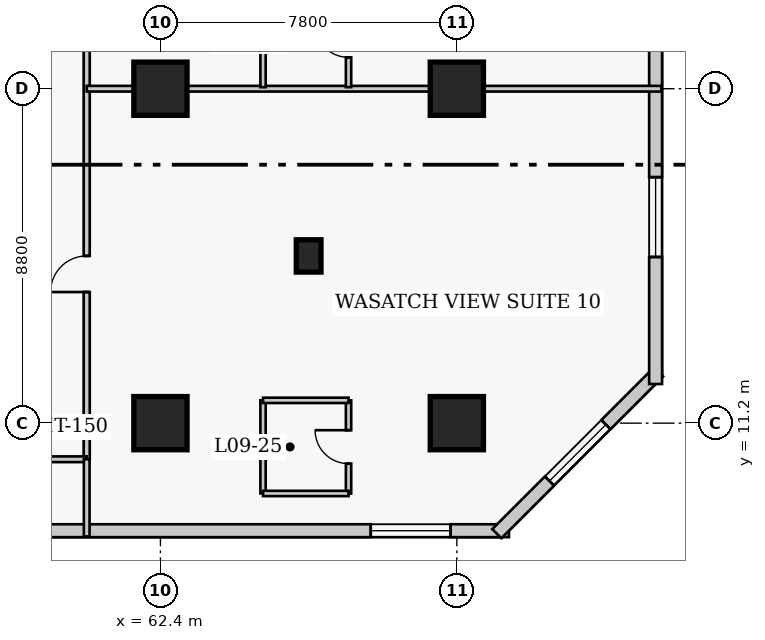
"""IFC4 building model, lengths in metres.
Left out: names, types, materials, properties, quantities, classifications, styles, units other than length and angle.
Written with IfcOpenShell. Run it as: python <this file> out.ifc"""

import sys

from ifc_helpers import new_model, si_unit, direction, frame, frame_2d, origin, origin_2d, place, context, subcontext, project, spatial, rectangle, extrude, element, fill, save


model = new_model("IFC4")
c1 = context("Model", 3, precision=1e-05, world=origin(), true_north=direction((0.0, 1.0)))
c2 = subcontext(c1, "Body", "Model", "MODEL_VIEW")
j1 = project(units=[si_unit("LENGTHUNIT", "METRE"), si_unit("PLANEANGLEUNIT", "RADIAN")], contexts=[c1])
p1 = place(None, origin())
s1 = spatial("IfcSite", under=j1, at=p1, CompositionType="ELEMENT")
p2 = place(p1, origin())
s2 = spatial("IfcBuilding", under=s1, at=p2, CompositionType="ELEMENT")
p3 = place(p2, frame((0.0, 0.0, 41.2)))
s3 = spatial("IfcBuildingStorey", under=s2, at=p3, CompositionType="ELEMENT", Elevation=41.2)
for number, where, z_axis, x_axis in (
    (1, (62.4, 11.2, 0.0), (0.0, 0.0, 1.0), (1.0, 0.0, 0.0)),
    (2, (62.4, 20.0, 0.0), (0.0, 0.0, 1.0), (1.0, 0.0, 0.0)),
    (3, (70.2, 11.2, 0.0), (0.0, 0.0, 1.0), (1.0, 0.0, 0.0)),
    (4, (70.2, 20.0, 0.0), (0.0, 0.0, 1.0), (1.0, 0.0, 0.0)),
):
    element("IfcColumn", number, at=place(p3, frame(where, z_axis=z_axis, x_axis=x_axis)), inside=s3, PredefinedType="COLUMN", context=c2, shape_type="SweptSolid", body=[
        extrude(rectangle(XDim=1.4, YDim=1.4, at=origin_2d()), origin(), (0.0, 0.0, 1.0), 3.8),
    ])
p4 = place(p3, frame((66.3, 15.6, 0.0), z_axis=(0.0, 0.0, 1.0), x_axis=(1.0, 0.0, 0.0)))
e5 = element("IfcColumn", 5, at=p4, inside=s3, PredefinedType="PILASTER", context=c2, shape_type="SweptSolid", body=[
    extrude(rectangle(XDim=0.65, YDim=0.85, at=origin_2d()), origin(), (0.0, 0.0, 1.0), 3.8),
])
p5 = place(p3, frame((41.68, 8.37, 0.0), z_axis=(0.0, 0.0, 1.0), x_axis=(1.0, 0.0, 0.0)))
e6 = element("IfcWall", 6, at=p5, inside=s3, PredefinedType="SOLIDWALL", context=c2, shape_type="SweptSolid", body=[
    extrude(rectangle(XDim=29.89, YDim=0.34, at=frame_2d((14.945, 0.0))), origin(), (0.0, 0.0, 1.0), 3.54),
])
p6 = place(p5, frame((2.036, 0.0, 0.85)))
e7 = element("IfcOpeningElement", 7, at=p6, cuts=e6, PredefinedType="OPENING", context=c2, shape_type="SweptSolid", body=[
    extrude(rectangle(XDim=2.1, YDim=1.85, at=frame_2d((1.05, 0.925))), frame((0.0, 0.18, 0.0), z_axis=(0.0, -1.0, 0.0), x_axis=(1.0, 0.0, 0.0)), (0.0, 0.0, 1.0), 0.36),
])
p7 = place(p5, frame((9.009, 0.0, 0.85)))
e8 = element("IfcOpeningElement", 8, at=p7, cuts=e6, PredefinedType="OPENING", context=c2, shape_type="SweptSolid", body=[
    extrude(rectangle(XDim=2.1, YDim=1.85, at=frame_2d((1.05, 0.925))), frame((0.0, 0.18, 0.0), z_axis=(0.0, -1.0, 0.0), x_axis=(1.0, 0.0, 0.0)), (0.0, 0.0, 1.0), 0.36),
])
p8 = place(p5, frame((26.254, 0.0, 0.85)))
e9 = element("IfcOpeningElement", 9, at=p8, cuts=e6, PredefinedType="OPENING", context=c2, shape_type="SweptSolid", body=[
    extrude(rectangle(XDim=2.1, YDim=1.85, at=frame_2d((1.05, 0.925))), frame((0.0, 0.18, 0.0), z_axis=(0.0, -1.0, 0.0), x_axis=(1.0, 0.0, 0.0)), (0.0, 0.0, 1.0), 0.36),
])
p9 = place(p5, frame((13.845, 0.0, 0.85)))
e10 = element("IfcOpeningElement", 10, at=p9, cuts=e6, PredefinedType="OPENING", context=c2, shape_type="SweptSolid", body=[
    extrude(rectangle(XDim=1.3, YDim=1.7, at=frame_2d((0.65, 0.85))), frame((0.0, 0.18, 0.0), z_axis=(0.0, -1.0, 0.0), x_axis=(1.0, 0.0, 0.0)), (0.0, 0.0, 1.0), 0.36),
])
p10 = place(p3, frame((71.251, 8.292, 0.0), z_axis=(0.0, 0.0, 1.0), x_axis=(0.707106781187, 0.707106781187, 0.0)))
e11 = element("IfcWall", 11, at=p10, inside=s3, PredefinedType="SOLIDWALL", context=c2, shape_type="SweptSolid", body=[
    extrude(rectangle(XDim=6.02, YDim=0.34, at=frame_2d((3.01, 0.0))), origin(), (0.0, 0.0, 1.0), 3.54),
])
p11 = place(p10, frame((1.96, 0.0, 0.85)))
e12 = element("IfcOpeningElement", 12, at=p11, cuts=e11, PredefinedType="OPENING", context=c2, shape_type="SweptSolid", body=[
    extrude(rectangle(XDim=2.1, YDim=1.85, at=frame_2d((1.05, 0.925))), frame((0.0, 0.18, 0.0), z_axis=(0.0, -1.0, 0.0), x_axis=(1.0, 0.0, 0.0)), (0.0, 0.0, 1.0), 0.36),
])
p12 = place(p3, frame((75.43, 12.23, 0.0), z_axis=(0.0, 0.0, 1.0), x_axis=(0.0, 1.0, 0.0)))
e13 = element("IfcWall", 13, at=p12, inside=s3, PredefinedType="SOLIDWALL", context=c2, shape_type="SweptSolid", body=[
    extrude(rectangle(XDim=35.14, YDim=0.34, at=frame_2d((17.57, 0.0))), origin(), (0.0, 0.0, 1.0), 3.54),
])
p13 = place(p12, frame((3.343, 0.0, 0.85)))
e14 = element("IfcOpeningElement", 14, at=p13, cuts=e13, PredefinedType="OPENING", context=c2, shape_type="SweptSolid", body=[
    extrude(rectangle(XDim=2.1, YDim=1.85, at=frame_2d((1.05, 0.925))), frame((0.0, 0.18, 0.0), z_axis=(0.0, -1.0, 0.0), x_axis=(1.0, 0.0, 0.0)), (0.0, 0.0, 1.0), 0.36),
])
p14 = place(p12, frame((12.127, 0.0, 0.85)))
e15 = element("IfcOpeningElement", 15, at=p14, cuts=e13, PredefinedType="OPENING", context=c2, shape_type="SweptSolid", body=[
    extrude(rectangle(XDim=2.1, YDim=1.85, at=frame_2d((1.05, 0.925))), frame((0.0, 0.18, 0.0), z_axis=(0.0, -1.0, 0.0), x_axis=(1.0, 0.0, 0.0)), (0.0, 0.0, 1.0), 0.36),
])
p15 = place(p12, frame((20.913, 0.0, 0.85)))
e16 = element("IfcOpeningElement", 16, at=p15, cuts=e13, PredefinedType="OPENING", context=c2, shape_type="SweptSolid", body=[
    extrude(rectangle(XDim=2.1, YDim=1.85, at=frame_2d((1.05, 0.925))), frame((0.0, 0.18, 0.0), z_axis=(0.0, -1.0, 0.0), x_axis=(1.0, 0.0, 0.0)), (0.0, 0.0, 1.0), 0.36),
])
p16 = place(p12, frame((29.698, 0.0, 0.85)))
e17 = element("IfcOpeningElement", 17, at=p16, cuts=e13, PredefinedType="OPENING", context=c2, shape_type="SweptSolid", body=[
    extrude(rectangle(XDim=2.1, YDim=1.85, at=frame_2d((1.05, 0.925))), frame((0.0, 0.18, 0.0), z_axis=(0.0, -1.0, 0.0), x_axis=(1.0, 0.0, 0.0)), (0.0, 0.0, 1.0), 0.36),
])
p17 = place(p3, frame((60.46, 10.25, 0.0), z_axis=(0.0, 0.0, 1.0), x_axis=(0.0, 1.0, 0.0)))
e18 = element("IfcWall", 18, at=p17, inside=s3, PredefinedType="PARTITIONING", context=c2, shape_type="SweptSolid", body=[
    extrude(rectangle(XDim=30.4, YDim=0.16, at=frame_2d((15.2, 0.0))), origin(), (0.0, 0.0, 1.0), 3.54),
])
p18 = place(p17, frame((4.4, 0.0, 0.0)))
e19 = element("IfcOpeningElement", 19, at=p18, cuts=e18, PredefinedType="OPENING", context=c2, shape_type="SweptSolid", body=[
    extrude(rectangle(XDim=0.95, YDim=2.1, at=frame_2d((0.475, 1.05))), frame((0.0, 0.09, 0.0), z_axis=(0.0, -1.0, 0.0), x_axis=(1.0, 0.0, 0.0)), (0.0, 0.0, 1.0), 0.18),
])
p19 = place(p17, frame((13.675, 0.0, 0.0)))
e20 = element("IfcOpeningElement", 20, at=p19, cuts=e18, PredefinedType="OPENING", context=c2, shape_type="SweptSolid", body=[
    extrude(rectangle(XDim=0.95, YDim=2.1, at=frame_2d((0.475, 1.05))), frame((0.0, 0.09, 0.0), z_axis=(0.0, -1.0, 0.0), x_axis=(1.0, 0.0, 0.0)), (0.0, 0.0, 1.0), 0.18),
])
p20 = place(p17, frame((21.475, 0.0, 0.0)))
e21 = element("IfcOpeningElement", 21, at=p20, cuts=e18, PredefinedType="OPENING", context=c2, shape_type="SweptSolid", body=[
    extrude(rectangle(XDim=0.95, YDim=2.1, at=frame_2d((0.475, 1.05))), frame((0.0, 0.09, 0.0), z_axis=(0.0, -1.0, 0.0), x_axis=(1.0, 0.0, 0.0)), (0.0, 0.0, 1.0), 0.18),
])
p21 = place(p17, frame((25.9, 0.0, 0.0)))
e22 = element("IfcOpeningElement", 22, at=p21, cuts=e18, PredefinedType="OPENING", context=c2, shape_type="SweptSolid", body=[
    extrude(rectangle(XDim=1.0, YDim=2.15, at=frame_2d((0.5, 1.075))), frame((0.0, 0.09, 0.0), z_axis=(0.0, -1.0, 0.0), x_axis=(1.0, 0.0, 0.0)), (0.0, 0.0, 1.0), 0.18),
])
p22 = place(p3, frame((58.24, 10.25, 0.0), z_axis=(0.0, 0.0, 1.0), x_axis=(1.0, 0.0, 0.0)))
e23 = element("IfcWall", 23, at=p22, inside=s3, PredefinedType="PARTITIONING", context=c2, shape_type="SweptSolid", body=[
    extrude(rectangle(XDim=2.22, YDim=0.15, at=frame_2d((1.11, 0.0))), origin(), (0.0, 0.0, 1.0), 3.54),
])
p23 = place(p3, frame((60.46, 8.22, 0.0), z_axis=(0.0, 0.0, 1.0), x_axis=(0.0, 1.0, 0.0)))
e24 = element("IfcWall", 24, at=p23, inside=s3, PredefinedType="PARTITIONING", context=c2, shape_type="SweptSolid", body=[
    extrude(rectangle(XDim=2.03, YDim=0.15, at=frame_2d((1.015, 0.0))), origin(), (0.0, 0.0, 1.0), 3.54),
])
p24 = place(p3, frame((65.1, 9.35, 0.0), z_axis=(0.0, 0.0, 1.0), x_axis=(0.0, 1.0, 0.0)))
e25 = element("IfcWall", 25, at=p24, inside=s3, PredefinedType="PLUMBINGWALL", context=c2, shape_type="SweptSolid", body=[
    extrude(rectangle(XDim=2.45, YDim=0.14, at=frame_2d((1.225, 0.0))), origin(), (0.0, 0.0, 1.0), 3.54),
])
p25 = place(p3, frame((67.35, 9.35, 0.0), z_axis=(0.0, 0.0, 1.0), x_axis=(0.0, 1.0, 0.0)))
e26 = element("IfcWall", 26, at=p25, inside=s3, PredefinedType="PLUMBINGWALL", context=c2, shape_type="SweptSolid", body=[
    extrude(rectangle(XDim=2.45, YDim=0.14, at=frame_2d((1.225, 0.0))), origin(), (0.0, 0.0, 1.0), 3.54),
])
p26 = place(p25, frame((0.785, 0.0, 0.0)))
e27 = element("IfcOpeningElement", 27, at=p26, cuts=e26, PredefinedType="OPENING", context=c2, shape_type="SweptSolid", body=[
    extrude(rectangle(XDim=0.88, YDim=2.05, at=frame_2d((0.44, 1.025))), frame((0.0, 0.08, 0.0), z_axis=(0.0, -1.0, 0.0), x_axis=(1.0, 0.0, 0.0)), (0.0, 0.0, 1.0), 0.16),
])
for number, where, z_axis, x_axis in (
    (28, (65.1, 9.35, 0.0), (0.0, 0.0, 1.0), (1.0, 0.0, 0.0)),
    (29, (65.1, 11.8, 0.0), (0.0, 0.0, 1.0), (1.0, 0.0, 0.0)),
):
    element("IfcWall", number, at=place(p3, frame(where, z_axis=z_axis, x_axis=x_axis)), inside=s3, PredefinedType="PLUMBINGWALL", context=c2, shape_type="SweptSolid", body=[
        extrude(rectangle(XDim=2.25, YDim=0.14, at=frame_2d((1.125, 0.0))), origin(), (0.0, 0.0, 1.0), 3.54),
    ])
p27 = place(p3, frame((60.46, 20.0, 0.0), z_axis=(0.0, 0.0, 1.0), x_axis=(1.0, 0.0, 0.0)))
e30 = element("IfcWall", 30, at=p27, inside=s3, PredefinedType="PARTITIONING", context=c2, shape_type="SweptSolid", body=[
    extrude(rectangle(XDim=15.12, YDim=0.15, at=frame_2d((7.56, 0.0))), origin(), (0.0, 0.0, 1.0), 2.593),
])
p28 = place(p3, frame((65.1, 20.04, 0.0), z_axis=(0.0, 0.0, 1.0), x_axis=(0.0, 1.0, 0.0)))
e31 = element("IfcWall", 31, at=p28, inside=s3, PredefinedType="PLUMBINGWALL", context=c2, shape_type="SweptSolid", body=[
    extrude(rectangle(XDim=2.45, YDim=0.14, at=frame_2d((1.225, 0.0))), origin(), (0.0, 0.0, 1.0), 3.54),
])
p29 = place(p3, frame((67.35, 20.04, 0.0), z_axis=(0.0, 0.0, 1.0), x_axis=(0.0, 1.0, 0.0)))
e32 = element("IfcWall", 32, at=p29, inside=s3, PredefinedType="PLUMBINGWALL", context=c2, shape_type="SweptSolid", body=[
    extrude(rectangle(XDim=2.45, YDim=0.14, at=frame_2d((1.225, 0.0))), origin(), (0.0, 0.0, 1.0), 3.54),
])
p30 = place(p29, frame((0.785, 0.0, 0.0)))
e33 = element("IfcOpeningElement", 33, at=p30, cuts=e32, PredefinedType="OPENING", context=c2, shape_type="SweptSolid", body=[
    extrude(rectangle(XDim=0.88, YDim=2.05, at=frame_2d((0.44, 1.025))), frame((0.0, 0.08, 0.0), z_axis=(0.0, -1.0, 0.0), x_axis=(1.0, 0.0, 0.0)), (0.0, 0.0, 1.0), 0.16),
])
p31 = place(p8, origin())
e34 = element("IfcWindow", 34, at=p31, inside=s3, PartitioningType="SINGLE_PANEL", PredefinedType="WINDOW", context=c2, shape_type="SweptSolid", body=[
    extrude(rectangle(XDim=2.1, YDim=1.85, at=frame_2d((1.05, 0.925))), frame((0.0, 0.03, 0.0), z_axis=(0.0, -1.0, 0.0), x_axis=(1.0, 0.0, 0.0)), (0.0, 0.0, 1.0), 0.06),
])
fill(e9, e34)
p32 = place(p11, origin())
e35 = element("IfcWindow", 35, at=p32, inside=s3, PartitioningType="SINGLE_PANEL", PredefinedType="WINDOW", context=c2, shape_type="SweptSolid", body=[
    extrude(rectangle(XDim=2.1, YDim=1.85, at=frame_2d((1.05, 0.925))), frame((0.0, 0.03, 0.0), z_axis=(0.0, -1.0, 0.0), x_axis=(1.0, 0.0, 0.0)), (0.0, 0.0, 1.0), 0.06),
])
fill(e12, e35)
p33 = place(p13, origin())
e36 = element("IfcWindow", 36, at=p33, inside=s3, PartitioningType="SINGLE_PANEL", PredefinedType="WINDOW", context=c2, shape_type="SweptSolid", body=[
    extrude(rectangle(XDim=2.1, YDim=1.85, at=frame_2d((1.05, 0.925))), frame((0.0, 0.03, 0.0), z_axis=(0.0, -1.0, 0.0), x_axis=(1.0, 0.0, 0.0)), (0.0, 0.0, 1.0), 0.06),
])
fill(e14, e36)
p34 = place(p26, origin())
e37 = element("IfcDoor", 37, at=p34, inside=s3, OperationType="SINGLE_SWING_RIGHT", PredefinedType="DOOR", context=c2, shape_type="SweptSolid", body=[
    extrude(rectangle(XDim=0.88, YDim=2.05, at=frame_2d((0.44, 1.025))), frame((0.0, 0.025, 0.0), z_axis=(0.0, -1.0, 0.0), x_axis=(1.0, 0.0, 0.0)), (0.0, 0.0, 1.0), 0.05),
])
fill(e27, e37)
p35 = place(p18, origin())
e38 = element("IfcDoor", 38, at=p35, inside=s3, OperationType="SINGLE_SWING_LEFT", PredefinedType="DOOR", context=c2, shape_type="SweptSolid", body=[
    extrude(rectangle(XDim=0.95, YDim=2.1, at=frame_2d((0.475, 1.05))), frame((0.0, 0.025, 0.0), z_axis=(0.0, -1.0, 0.0), x_axis=(1.0, 0.0, 0.0)), (0.0, 0.0, 1.0), 0.05),
])
fill(e19, e38)
p36 = place(p30, origin())
e39 = element("IfcDoor", 39, at=p36, inside=s3, OperationType="SINGLE_SWING_RIGHT", PredefinedType="DOOR", context=c2, shape_type="SweptSolid", body=[
    extrude(rectangle(XDim=0.88, YDim=2.05, at=frame_2d((0.44, 1.025))), frame((0.0, 0.025, 0.0), z_axis=(0.0, -1.0, 0.0), x_axis=(1.0, 0.0, 0.0)), (0.0, 0.0, 1.0), 0.05),
])
fill(e33, e39)
save(model, sys.argv[1])
